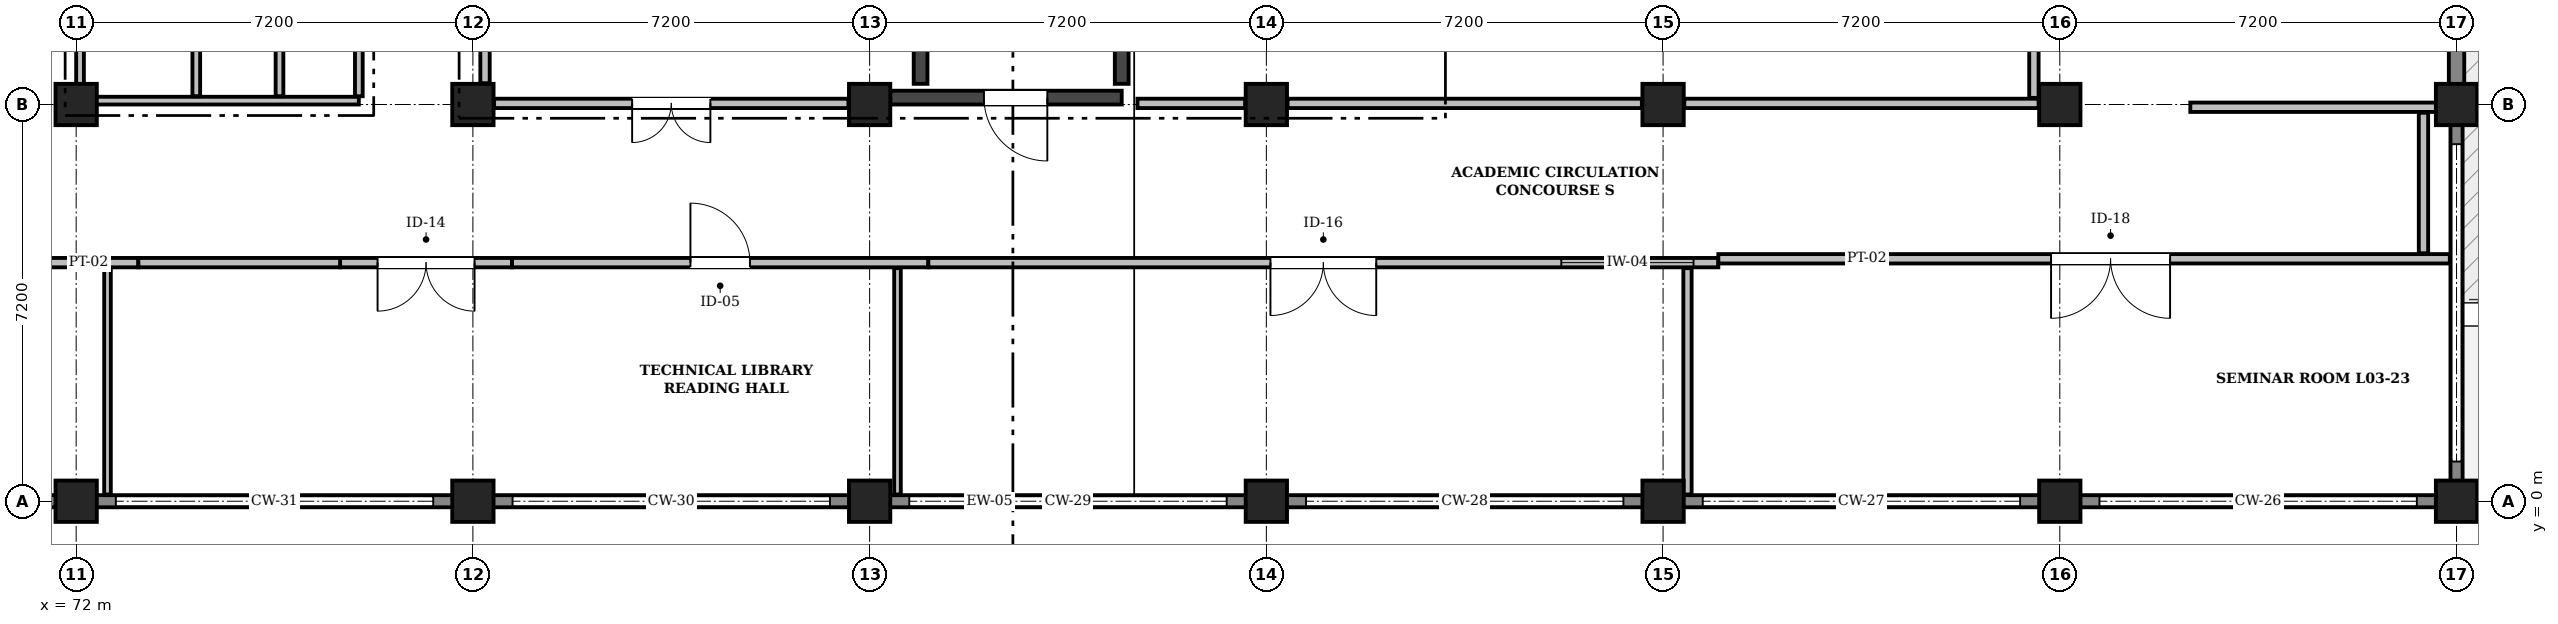
"""IFC4 building model, lengths in metres.
Left out: names, types, materials, properties, quantities, classifications, styles, units other than length and angle.
Written with IfcOpenShell. Run it as: python <this file> out.ifc"""

import sys

from ifc_helpers import new_model, si_unit, direction, frame, frame_2d, origin, origin_2d, place, context, subcontext, project, spatial, rectangle, extrude, element, fill, save


model = new_model("IFC4")
c1 = context("Model", 3, precision=1e-05, world=origin(), true_north=direction((0.0, 1.0)))
c2 = subcontext(c1, "Body", "Model", "MODEL_VIEW")
j1 = project(units=[si_unit("LENGTHUNIT", "METRE"), si_unit("PLANEANGLEUNIT", "RADIAN")], contexts=[c1])
p1 = place(None, origin())
s1 = spatial("IfcSite", under=j1, at=p1, CompositionType="ELEMENT")
p2 = place(p1, origin())
s2 = spatial("IfcBuilding", under=s1, at=p2, CompositionType="ELEMENT")
p3 = place(p2, frame((0.0, 0.0, 14.4)))
s3 = spatial("IfcBuildingStorey", under=s2, at=p3, CompositionType="ELEMENT", Elevation=14.4)
for number, where, z_axis, x_axis in (
    (1, (72.0, 0.0, 0.0), (0.0, 0.0, 1.0), (1.0, 0.0, 0.0)),
    (2, (72.0, 7.2, 0.0), (0.0, 0.0, 1.0), (1.0, 0.0, 0.0)),
    (3, (79.2, 0.0, 0.0), (0.0, 0.0, 1.0), (1.0, 0.0, 0.0)),
    (4, (79.2, 7.2, 0.0), (0.0, 0.0, 1.0), (1.0, 0.0, 0.0)),
    (5, (86.4, 0.0, 0.0), (0.0, 0.0, 1.0), (1.0, 0.0, 0.0)),
    (6, (86.4, 7.2, 0.0), (0.0, 0.0, 1.0), (1.0, 0.0, 0.0)),
    (7, (93.6, 0.0, 0.0), (0.0, 0.0, 1.0), (1.0, 0.0, 0.0)),
    (8, (93.6, 7.2, 0.0), (0.0, 0.0, 1.0), (1.0, 0.0, 0.0)),
    (9, (100.8, 0.0, 0.0), (0.0, 0.0, 1.0), (1.0, 0.0, 0.0)),
    (10, (100.8, 7.2, 0.0), (0.0, 0.0, 1.0), (1.0, 0.0, 0.0)),
    (11, (108.0, 0.0, 0.0), (0.0, 0.0, 1.0), (1.0, 0.0, 0.0)),
    (12, (108.0, 7.2, 0.0), (0.0, 0.0, 1.0), (1.0, 0.0, 0.0)),
    (13, (115.2, 0.0, 0.0), (0.0, 0.0, 1.0), (1.0, 0.0, 0.0)),
    (14, (115.2, 7.2, 0.0), (0.0, 0.0, 1.0), (1.0, 0.0, 0.0)),
):
    element("IfcColumn", number, at=place(p3, frame(where, z_axis=z_axis, x_axis=x_axis)), inside=s3, PredefinedType="COLUMN", context=c2, shape_type="SweptSolid", body=[
        extrude(rectangle(XDim=0.75, YDim=0.75, at=origin_2d()), origin(), (0.0, 0.0, 1.0), 4.5),
    ])
p4 = place(p3, frame((115.35, 0.0, 0.0), z_axis=(0.0, 0.0, 1.0), x_axis=(-1.0, 0.0, 0.0)))
e15 = element("IfcWall", 15, at=p4, inside=s3, PredefinedType="SOLIDWALL", context=c2, shape_type="SweptSolid", body=[
    extrude(rectangle(XDim=7.35, YDim=0.22, at=frame_2d((3.675, 0.0))), origin(), (0.0, 0.0, 1.0), 1.24),
])
for number, where, z_axis, x_axis in (
    (16, (108.0, 0.0, 0.0), (0.0, 0.0, 1.0), (-1.0, 0.0, 0.0)),
    (17, (100.8, 0.0, 0.0), (0.0, 0.0, 1.0), (-1.0, 0.0, 0.0)),
):
    element("IfcWall", number, at=place(p3, frame(where, z_axis=z_axis, x_axis=x_axis)), inside=s3, PredefinedType="SOLIDWALL", context=c2, shape_type="SweptSolid", body=[
        extrude(rectangle(XDim=7.2, YDim=0.22, at=frame_2d((3.6, 0.0))), origin(), (0.0, 0.0, 1.0), 1.24),
    ])
p5 = place(p3, frame((93.6, 0.0, 0.0), z_axis=(0.0, 0.0, 1.0), x_axis=(-1.0, 0.0, 0.0)))
e18 = element("IfcWall", 18, at=p5, inside=s3, PredefinedType="SOLIDWALL", context=c2, shape_type="SweptSolid", body=[
    extrude(rectangle(XDim=7.2, YDim=0.22, at=frame_2d((3.6, 0.0))), origin(), (0.0, 0.0, 1.0), 1.24),
])
for number, where, z_axis, x_axis in (
    (19, (86.4, 0.0, 0.0), (0.0, 0.0, 1.0), (-1.0, 0.0, 0.0)),
    (20, (79.2, 0.0, 0.0), (0.0, 0.0, 1.0), (-1.0, 0.0, 0.0)),
    (21, (72.0, 0.0, 0.0), (0.0, 0.0, 1.0), (-1.0, 0.0, 0.0)),
):
    element("IfcWall", number, at=place(p3, frame(where, z_axis=z_axis, x_axis=x_axis)), inside=s3, PredefinedType="SOLIDWALL", context=c2, shape_type="SweptSolid", body=[
        extrude(rectangle(XDim=7.2, YDim=0.22, at=frame_2d((3.6, 0.0))), origin(), (0.0, 0.0, 1.0), 1.24),
    ])
p6 = place(p3, frame((115.2, 14.4, 0.0), z_axis=(0.0, 0.0, 1.0), x_axis=(0.0, -1.0, 0.0)))
e22 = element("IfcWall", 22, at=p6, inside=s3, PredefinedType="SOLIDWALL", context=c2, shape_type="SweptSolid", body=[
    extrude(rectangle(XDim=7.2, YDim=0.28, at=frame_2d((3.6, 0.0))), origin(), (0.0, 0.0, 1.0), 4.22),
])
p7 = place(p6, frame((3.01, 0.0, 0.0)))
e23 = element("IfcOpeningElement", 23, at=p7, cuts=e22, PredefinedType="OPENING", context=c2, shape_type="SweptSolid", body=[
    extrude(rectangle(XDim=1.18, YDim=2.18, at=frame_2d((0.59, 1.09))), frame((0.0, 0.152, 0.0), z_axis=(0.0, -1.0, 0.0), x_axis=(1.0, 0.0, 0.0)), (0.0, 0.0, 1.0), 0.304),
])
p8 = place(p3, frame((115.2, 7.2, 0.0), z_axis=(0.0, 0.0, 1.0), x_axis=(0.0, -1.0, 0.0)))
e24 = element("IfcWall", 24, at=p8, inside=s3, PredefinedType="SOLIDWALL", context=c2, shape_type="SweptSolid", body=[
    extrude(rectangle(XDim=7.048, YDim=0.22, at=frame_2d((3.524, 0.0))), origin(), (0.0, 0.0, 1.0), 1.24),
])
p9 = place(p3, frame((86.775, 7.325, 0.0), z_axis=(0.0, 0.0, 1.0), x_axis=(1.0, 0.0, 0.0)))
e25 = element("IfcWall", 25, at=p9, inside=s3, PredefinedType="SHEAR", context=c2, shape_type="SweptSolid", body=[
    extrude(rectangle(XDim=4.2, YDim=0.25, at=frame_2d((2.1, 0.0))), origin(), (0.0, 0.0, 1.0), 4.25),
])
p10 = place(p9, frame((1.7, 0.0, 0.0)))
e26 = element("IfcOpeningElement", 26, at=p10, cuts=e25, PredefinedType="OPENING", context=c2, shape_type="SweptSolid", body=[
    extrude(rectangle(XDim=1.15, YDim=2.15, at=frame_2d((0.575, 1.075))), frame((0.0, 0.137, 0.0), z_axis=(0.0, -1.0, 0.0), x_axis=(1.0, 0.0, 0.0)), (0.0, 0.0, 1.0), 0.274),
])
p11 = place(p3, frame((87.325, 7.575, 0.0), z_axis=(0.0, 0.0, 1.0), x_axis=(0.0, 1.0, 0.0)))
e27 = element("IfcWall", 27, at=p11, inside=s3, PredefinedType="SHEAR", context=c2, shape_type="SweptSolid", body=[
    extrude(rectangle(XDim=2.77, YDim=0.25, at=frame_2d((1.385, 0.0))), origin(), (0.0, 0.0, 1.0), 4.25),
])
p12 = place(p3, frame((90.975, 7.575, 0.0), z_axis=(0.0, 0.0, 1.0), x_axis=(0.0, 1.0, 0.0)))
e28 = element("IfcWall", 28, at=p12, inside=s3, PredefinedType="SHEAR", context=c2, shape_type="SweptSolid", body=[
    extrude(rectangle(XDim=3.225, YDim=0.25, at=frame_2d((1.613, 0.0))), origin(), (0.0, 0.0, 1.0), 4.25),
])
p13 = place(p3, frame((72.07, 7.27, 0.0), z_axis=(0.0, 0.0, 1.0), x_axis=(1.0, 0.0, 0.0)))
e29 = element("IfcWall", 29, at=p13, inside=s3, PredefinedType="PARTITIONING", context=c2, shape_type="SweptSolid", body=[
    extrude(rectangle(XDim=5.06, YDim=0.14, at=frame_2d((2.53, 0.0))), origin(), (0.0, 0.0, 1.0), 3.7),
])
p14 = place(p3, frame((72.07, 7.35, 0.0), z_axis=(0.0, 0.0, 1.0), x_axis=(0.0, 1.0, 0.0)))
e30 = element("IfcWall", 30, at=p14, inside=s3, PredefinedType="PARTITIONING", context=c2, shape_type="SweptSolid", body=[
    extrude(rectangle(XDim=6.9, YDim=0.14, at=frame_2d((3.45, 0.0))), origin(), (0.0, 0.0, 1.0), 3.73),
])
p15 = place(p3, frame((77.13, 7.35, 0.0), z_axis=(0.0, 0.0, 1.0), x_axis=(0.0, 1.0, 0.0)))
e31 = element("IfcWall", 31, at=p15, inside=s3, PredefinedType="PARTITIONING", context=c2, shape_type="SweptSolid", body=[
    extrude(rectangle(XDim=6.9, YDim=0.14, at=frame_2d((3.45, 0.0))), origin(), (0.0, 0.0, 1.0), 4.16),
])
p16 = place(p3, frame((74.18, 7.35, 0.0), z_axis=(0.0, 0.0, 1.0), x_axis=(0.0, 1.0, 0.0)))
e32 = element("IfcWall", 32, at=p16, inside=s3, PredefinedType="PARTITIONING", context=c2, shape_type="SweptSolid", body=[
    extrude(rectangle(XDim=6.9, YDim=0.14, at=frame_2d((3.45, 0.0))), origin(), (0.0, 0.0, 1.0), 4.16),
])
p17 = place(p16, frame((1.45, 0.0, 0.0)))
e33 = element("IfcOpeningElement", 33, at=p17, cuts=e32, PredefinedType="OPENING", context=c2, shape_type="SweptSolid", body=[
    extrude(rectangle(XDim=0.9, YDim=2.08, at=frame_2d((0.45, 1.04))), frame((0.0, 0.082, 0.0), z_axis=(0.0, -1.0, 0.0), x_axis=(1.0, 0.0, 0.0)), (0.0, 0.0, 1.0), 0.164),
])
p18 = place(p3, frame((75.69, 7.35, 0.0), z_axis=(0.0, 0.0, 1.0), x_axis=(0.0, 1.0, 0.0)))
e34 = element("IfcWall", 34, at=p18, inside=s3, PredefinedType="PARTITIONING", context=c2, shape_type="SweptSolid", body=[
    extrude(rectangle(XDim=6.9, YDim=0.14, at=frame_2d((3.45, 0.0))), origin(), (0.0, 0.0, 1.0), 4.16),
])
p19 = place(p3, frame((76.79, 4.33, 0.0), z_axis=(0.0, 0.0, 1.0), x_axis=(1.0, 0.0, 0.0)))
e35 = element("IfcWall", 35, at=p19, inside=s3, PredefinedType="PARTITIONING", context=c2, shape_type="SweptSolid", body=[
    extrude(rectangle(XDim=3.12, YDim=0.17, at=frame_2d((1.56, 0.0))), origin(), (0.0, 0.0, 1.0), 4.16),
])
p20 = place(p19, frame((0.68, 0.0, 0.0)))
e36 = element("IfcOpeningElement", 36, at=p20, cuts=e35, PredefinedType="OPENING", context=c2, shape_type="SweptSolid", body=[
    extrude(rectangle(XDim=1.76, YDim=2.3, at=frame_2d((0.88, 1.15))), frame((0.0, 0.097, 0.0), z_axis=(0.0, -1.0, 0.0), x_axis=(1.0, 0.0, 0.0)), (0.0, 0.0, 1.0), 0.194),
])
p21 = place(p3, frame((79.42, 7.585, 0.0), z_axis=(0.0, 0.0, 1.0), x_axis=(0.0, 1.0, 0.0)))
e37 = element("IfcWall", 37, at=p21, inside=s3, PredefinedType="PARTITIONING", context=c2, shape_type="SweptSolid", body=[
    extrude(rectangle(XDim=2.465, YDim=0.17, at=frame_2d((1.233, 0.0))), origin(), (0.0, 0.0, 1.0), 3.73),
])
p22 = place(p3, frame((79.91, 4.33, 0.0), z_axis=(0.0, 0.0, 1.0), x_axis=(1.0, 0.0, 0.0)))
e38 = element("IfcWall", 38, at=p22, inside=s3, PredefinedType="PARTITIONING", context=c2, shape_type="SweptSolid", body=[
    extrude(rectangle(XDim=7.556, YDim=0.17, at=frame_2d((3.778, 0.0))), origin(), (0.0, 0.0, 1.0), 4.16),
])
p23 = place(p22, frame((3.238, 0.0, 0.0)))
e39 = element("IfcOpeningElement", 39, at=p23, cuts=e38, PredefinedType="OPENING", context=c2, shape_type="SweptSolid", body=[
    extrude(rectangle(XDim=1.08, YDim=2.2, at=frame_2d((0.54, 1.1))), frame((0.0, 0.097, 0.0), z_axis=(0.0, -1.0, 0.0), x_axis=(1.0, 0.0, 0.0)), (0.0, 0.0, 1.0), 0.194),
])
p24 = place(p3, frame((87.466, 4.33, 0.0), z_axis=(0.0, 0.0, 1.0), x_axis=(1.0, 0.0, 0.0)))
e40 = element("IfcWall", 40, at=p24, inside=s3, PredefinedType="PARTITIONING", context=c2, shape_type="SweptSolid", body=[
    extrude(rectangle(XDim=14.337, YDim=0.17, at=frame_2d((7.168, 0.0))), origin(), (0.0, 0.0, 1.0), 4.16),
])
p25 = place(p24, frame((6.208, 0.0, 0.0)))
e41 = element("IfcOpeningElement", 41, at=p25, cuts=e40, PredefinedType="OPENING", context=c2, shape_type="SweptSolid", body=[
    extrude(rectangle(XDim=1.92, YDim=2.32, at=frame_2d((0.96, 1.16))), frame((0.0, 0.097, 0.0), z_axis=(0.0, -1.0, 0.0), x_axis=(1.0, 0.0, 0.0)), (0.0, 0.0, 1.0), 0.194),
])
p26 = place(p24, frame((11.487, 0.0, 1.05)))
e42 = element("IfcOpeningElement", 42, at=p26, cuts=e40, PredefinedType="OPENING", context=c2, shape_type="SweptSolid", body=[
    extrude(rectangle(XDim=2.4, YDim=1.15, at=frame_2d((1.2, 0.575))), frame((0.0, 0.097, 0.0), z_axis=(0.0, -1.0, 0.0), x_axis=(1.0, 0.0, 0.0)), (0.0, 0.0, 1.0), 0.194),
])
p27 = place(p3, frame((101.803, 4.4, 0.0), z_axis=(0.0, 0.0, 1.0), x_axis=(1.0, 0.0, 0.0)))
e43 = element("IfcWall", 43, at=p27, inside=s3, PredefinedType="PARTITIONING", context=c2, shape_type="SweptSolid", body=[
    extrude(rectangle(XDim=13.275, YDim=0.17, at=frame_2d((6.637, 0.0))), origin(), (0.0, 0.0, 1.0), 4.16),
])
p28 = place(p27, frame((6.039, 0.0, 0.0)))
e44 = element("IfcOpeningElement", 44, at=p28, cuts=e43, PredefinedType="OPENING", context=c2, shape_type="SweptSolid", body=[
    extrude(rectangle(XDim=2.16, YDim=2.35, at=frame_2d((1.08, 1.175))), frame((0.0, 0.097, 0.0), z_axis=(0.0, -1.0, 0.0), x_axis=(1.0, 0.0, 0.0)), (0.0, 0.0, 1.0), 0.194),
])
p29 = place(p3, frame((110.368, 7.15, 0.0), z_axis=(0.0, 0.0, 1.0), x_axis=(1.0, 0.0, 0.0)))
e45 = element("IfcWall", 45, at=p29, inside=s3, PredefinedType="PARTITIONING", context=c2, shape_type="SweptSolid", body=[
    extrude(rectangle(XDim=4.709, YDim=0.17, at=frame_2d((2.355, 0.0))), origin(), (0.0, 0.0, 1.0), 2.78),
])
p30 = place(p3, frame((114.6, 4.5, 0.0), z_axis=(0.0, 0.0, 1.0), x_axis=(0.0, 1.0, 0.0)))
e46 = element("IfcWall", 46, at=p30, inside=s3, PredefinedType="PARTITIONING", context=c2, shape_type="SweptSolid", body=[
    extrude(rectangle(XDim=2.55, YDim=0.17, at=frame_2d((1.275, 0.0))), origin(), (0.0, 0.0, 1.0), 4.16),
])
p31 = place(p3, frame((79.585, 7.22, 0.0), z_axis=(0.0, 0.0, 1.0), x_axis=(1.0, 0.0, 0.0)))
e47 = element("IfcWall", 47, at=p31, inside=s3, PredefinedType="PARTITIONING", context=c2, shape_type="SweptSolid", body=[
    extrude(rectangle(XDim=6.43, YDim=0.17, at=frame_2d((3.215, 0.0))), origin(), (0.0, 0.0, 1.0), 3.7),
])
p32 = place(p31, frame((2.505, 0.0, 0.0)))
e48 = element("IfcOpeningElement", 48, at=p32, cuts=e47, PredefinedType="OPENING", context=c2, shape_type="SweptSolid", body=[
    extrude(rectangle(XDim=1.42, YDim=2.24, at=frame_2d((0.71, 1.12))), frame((0.0, 0.097, 0.0), z_axis=(0.0, -1.0, 0.0), x_axis=(1.0, 0.0, 0.0)), (0.0, 0.0, 1.0), 0.194),
])
p33 = place(p3, frame((91.261, 7.22, 0.0), z_axis=(0.0, 0.0, 1.0), x_axis=(1.0, 0.0, 0.0)))
e49 = element("IfcWall", 49, at=p33, inside=s3, PredefinedType="PARTITIONING", context=c2, shape_type="SweptSolid", body=[
    extrude(rectangle(XDim=1.954, YDim=0.17, at=frame_2d((0.977, 0.0))), origin(), (0.0, 0.0, 1.0), 3.7),
])
for number, where, z_axis, x_axis in (
    (50, (93.985, 7.22, 0.0), (0.0, 0.0, 1.0), (1.0, 0.0, 0.0)),
    (51, (101.185, 7.22, 0.0), (0.0, 0.0, 1.0), (1.0, 0.0, 0.0)),
):
    element("IfcWall", number, at=place(p3, frame(where, z_axis=z_axis, x_axis=x_axis)), inside=s3, PredefinedType="PARTITIONING", context=c2, shape_type="SweptSolid", body=[
        extrude(rectangle(XDim=6.43, YDim=0.17, at=frame_2d((3.215, 0.0))), origin(), (0.0, 0.0, 1.0), 3.7),
    ])
p34 = place(p3, frame((58.792, 4.33, 0.0), z_axis=(0.0, 0.0, 1.0), x_axis=(1.0, 0.0, 0.0)))
e52 = element("IfcWall", 52, at=p34, inside=s3, PredefinedType="PARTITIONING", context=c2, shape_type="SweptSolid", body=[
    extrude(rectangle(XDim=14.337, YDim=0.17, at=frame_2d((7.168, 0.0))), origin(), (0.0, 0.0, 1.0), 4.16),
])
p35 = place(p34, frame((6.149, 0.0, 0.0)))
e53 = element("IfcOpeningElement", 53, at=p35, cuts=e52, PredefinedType="OPENING", context=c2, shape_type="SweptSolid", body=[
    extrude(rectangle(XDim=2.04, YDim=2.34, at=frame_2d((1.02, 1.17))), frame((0.0, 0.097, 0.0), z_axis=(0.0, -1.0, 0.0), x_axis=(1.0, 0.0, 0.0)), (0.0, 0.0, 1.0), 0.194),
])
p36 = place(p3, frame((73.129, 4.33, 0.0), z_axis=(0.0, 0.0, 1.0), x_axis=(1.0, 0.0, 0.0)))
e54 = element("IfcWall", 54, at=p36, inside=s3, PredefinedType="PARTITIONING", context=c2, shape_type="SweptSolid", body=[
    extrude(rectangle(XDim=3.661, YDim=0.17, at=frame_2d((1.831, 0.0))), origin(), (0.0, 0.0, 1.0), 4.16),
])
p37 = place(p3, frame((107.53, 7.32, 0.0), z_axis=(0.0, 0.0, 1.0), x_axis=(0.0, 1.0, 0.0)))
e55 = element("IfcWall", 55, at=p37, inside=s3, PredefinedType="PARTITIONING", context=c2, shape_type="SweptSolid", body=[
    extrude(rectangle(XDim=7.11, YDim=0.17, at=frame_2d((3.555, 0.0))), origin(), (0.0, 0.0, 1.0), 4.16),
])
p38 = place(p37, frame((2.985, 0.0, 0.0)))
e56 = element("IfcOpeningElement", 56, at=p38, cuts=e55, PredefinedType="OPENING", context=c2, shape_type="SweptSolid", body=[
    extrude(rectangle(XDim=1.14, YDim=2.2, at=frame_2d((0.57, 1.1))), frame((0.0, 0.097, 0.0), z_axis=(0.0, -1.0, 0.0), x_axis=(1.0, 0.0, 0.0)), (0.0, 0.0, 1.0), 0.194),
])
for number, where, z_axis, x_axis in (
    (57, (72.569, 0.122, 0.0), (0.0, 0.0, 1.0), (0.0, 1.0, 0.0)),
    (58, (86.906, 0.122, 0.0), (0.0, 0.0, 1.0), (0.0, 1.0, 0.0)),
):
    element("IfcWall", number, at=place(p3, frame(where, z_axis=z_axis, x_axis=x_axis)), inside=s3, PredefinedType="PARTITIONING", context=c2, shape_type="SweptSolid", body=[
        extrude(rectangle(XDim=4.108, YDim=0.12, at=frame_2d((2.054, 0.0))), origin(), (0.0, 0.0, 1.0), 4.16),
    ])
p39 = place(p3, frame((101.243, 0.122, 0.0), z_axis=(0.0, 0.0, 1.0), x_axis=(0.0, 1.0, 0.0)))
e59 = element("IfcWall", 59, at=p39, inside=s3, PredefinedType="PARTITIONING", context=c2, shape_type="SweptSolid", body=[
    extrude(rectangle(XDim=4.108, YDim=0.15, at=frame_2d((2.054, 0.0))), origin(), (0.0, 0.0, 1.0), 4.16),
])
p40 = place(p10, frame((1.15, 0.0, 0.0), z_axis=(0.0, 0.0, 1.0), x_axis=(-1.0, 0.0, 0.0)))
e60 = element("IfcDoor", 60, at=p40, inside=s3, OperationType="SINGLE_SWING_LEFT", PredefinedType="DOOR", context=c2, shape_type="SweptSolid", body=[
    extrude(rectangle(XDim=1.15, YDim=2.15, at=frame_2d((0.575, 1.075))), frame((0.0, 0.025, 0.0), z_axis=(0.0, -1.0, 0.0), x_axis=(1.0, 0.0, 0.0)), (0.0, 0.0, 1.0), 0.05),
])
fill(e26, e60)
p41 = place(p25, frame((1.92, 0.0, 0.0), z_axis=(0.0, 0.0, 1.0), x_axis=(-1.0, 0.0, 0.0)))
e61 = element("IfcDoor", 61, at=p41, inside=s3, OperationType="DOUBLE_DOOR_SINGLE_SWING", PredefinedType="DOOR", context=c2, shape_type="SweptSolid", body=[
    extrude(rectangle(XDim=1.92, YDim=2.32, at=frame_2d((0.96, 1.16))), frame((0.0, 0.025, 0.0), z_axis=(0.0, -1.0, 0.0), x_axis=(1.0, 0.0, 0.0)), (0.0, 0.0, 1.0), 0.05),
])
fill(e41, e61)
p42 = place(p26, origin())
e62 = element("IfcWindow", 62, at=p42, inside=s3, PartitioningType="SINGLE_PANEL", PredefinedType="WINDOW", context=c2, shape_type="SweptSolid", body=[
    extrude(rectangle(XDim=2.4, YDim=1.15, at=frame_2d((1.2, 0.575))), frame((0.0, 0.03, 0.0), z_axis=(0.0, -1.0, 0.0), x_axis=(1.0, 0.0, 0.0)), (0.0, 0.0, 1.0), 0.06),
])
fill(e42, e62)
p43 = place(p28, frame((2.16, 0.0, 0.0), z_axis=(0.0, 0.0, 1.0), x_axis=(-1.0, 0.0, 0.0)))
e63 = element("IfcDoor", 63, at=p43, inside=s3, OperationType="DOUBLE_DOOR_SINGLE_SWING", PredefinedType="DOOR", context=c2, shape_type="SweptSolid", body=[
    extrude(rectangle(XDim=2.16, YDim=2.35, at=frame_2d((1.08, 1.175))), frame((0.0, 0.025, 0.0), z_axis=(0.0, -1.0, 0.0), x_axis=(1.0, 0.0, 0.0)), (0.0, 0.0, 1.0), 0.05),
])
fill(e44, e63)
p44 = place(p23, origin())
e64 = element("IfcDoor", 64, at=p44, inside=s3, OperationType="SINGLE_SWING_LEFT", PredefinedType="DOOR", context=c2, shape_type="SweptSolid", body=[
    extrude(rectangle(XDim=1.08, YDim=2.2, at=frame_2d((0.54, 1.1))), frame((0.0, 0.025, 0.0), z_axis=(0.0, -1.0, 0.0), x_axis=(1.0, 0.0, 0.0)), (0.0, 0.0, 1.0), 0.05),
])
fill(e39, e64)
p45 = place(p32, frame((1.42, 0.0, 0.0), z_axis=(0.0, 0.0, 1.0), x_axis=(-1.0, 0.0, 0.0)))
e65 = element("IfcDoor", 65, at=p45, inside=s3, OperationType="DOUBLE_DOOR_SINGLE_SWING", PredefinedType="DOOR", context=c2, shape_type="SweptSolid", body=[
    extrude(rectangle(XDim=1.42, YDim=2.24, at=frame_2d((0.71, 1.12))), frame((0.0, 0.025, 0.0), z_axis=(0.0, -1.0, 0.0), x_axis=(1.0, 0.0, 0.0)), (0.0, 0.0, 1.0), 0.05),
])
fill(e48, e65)
p46 = place(p20, frame((1.76, 0.0, 0.0), z_axis=(0.0, 0.0, 1.0), x_axis=(-1.0, 0.0, 0.0)))
e66 = element("IfcDoor", 66, at=p46, inside=s3, OperationType="DOUBLE_DOOR_SINGLE_SWING", PredefinedType="DOOR", context=c2, shape_type="SweptSolid", body=[
    extrude(rectangle(XDim=1.76, YDim=2.3, at=frame_2d((0.88, 1.15))), frame((0.0, 0.025, 0.0), z_axis=(0.0, -1.0, 0.0), x_axis=(1.0, 0.0, 0.0)), (0.0, 0.0, 1.0), 0.05),
])
fill(e36, e66)
save(model, sys.argv[1])
